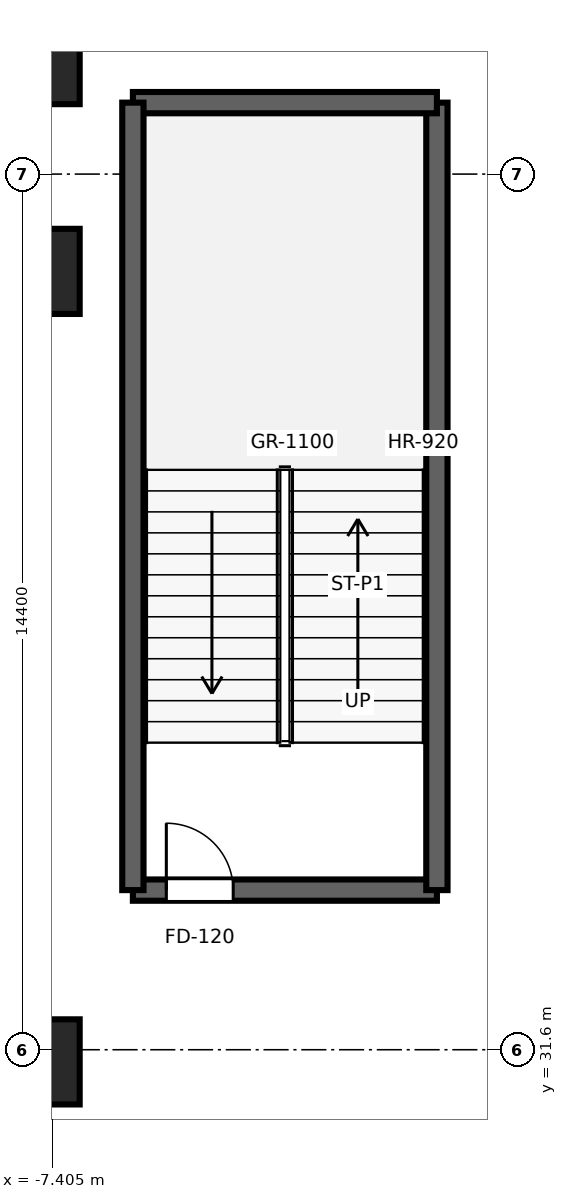
"""IFC4 building model, lengths in metres.
Left out: names, types, materials, properties, quantities, classifications, styles, units other than length and angle.
Written with IfcOpenShell. Run it as: python <this file> out.ifc"""

import sys

from ifc_helpers import new_model, si_unit, direction, frame, frame_2d, origin, origin_2d, place, context, subcontext, project, spatial, rectangle, extrude, source, transform, mapped, element, fill, save


model = new_model("IFC4")
c1 = context("Model", 3, precision=1e-05, world=origin(), true_north=direction((0.0, 1.0)))
c2 = subcontext(c1, "Body", "Model", "MODEL_VIEW")
j1 = project(units=[si_unit("LENGTHUNIT", "METRE"), si_unit("PLANEANGLEUNIT", "RADIAN")], contexts=[c1])
p1 = place(None, origin())
s1 = spatial("IfcSite", under=j1, at=p1, CompositionType="ELEMENT")
p2 = place(p1, origin())
s2 = spatial("IfcBuilding", under=s1, at=p2, CompositionType="ELEMENT")
p3 = place(p2, frame((0.0, 0.0, 6.0)))
s3 = spatial("IfcBuildingStorey", under=s2, at=p3, CompositionType="ELEMENT", Elevation=6.0)
p4 = place(p3, frame((-6.075, 34.225, 0.0), z_axis=(0.0, 0.0, 1.0), x_axis=(1.0, 0.0, 0.0)))
e1 = element("IfcWall", 1, at=p4, inside=s3, PredefinedType="SHEAR", context=c2, shape_type="SweptSolid", body=[
    extrude(rectangle(XDim=5.0, YDim=0.35, at=frame_2d((2.5, 0.0))), origin(), (0.0, 0.0, 1.0), 5.0),
])
p5 = place(p4, frame((0.55, 0.0, 0.0)))
e2 = element("IfcOpeningElement", 2, at=p5, cuts=e1, PredefinedType="OPENING", context=c2, shape_type="SweptSolid", body=[
    extrude(rectangle(XDim=1.1, YDim=2.12, at=frame_2d((0.55, 1.06))), frame((0.0, 0.185, 0.0), z_axis=(0.0, -1.0, 0.0), x_axis=(1.0, 0.0, 0.0)), (0.0, 0.0, 1.0), 0.37),
])
p6 = place(p3, frame((-1.075, 34.225, 0.0), z_axis=(0.0, 0.0, 1.0), x_axis=(0.0, 1.0, 0.0)))
e3 = element("IfcWall", 3, at=p6, inside=s3, PredefinedType="SHEAR", context=c2, shape_type="SweptSolid", body=[
    extrude(rectangle(XDim=12.95, YDim=0.35, at=frame_2d((6.475, 0.0))), origin(), (0.0, 0.0, 1.0), 5.0),
])
p7 = place(p3, frame((-1.075, 47.175, 0.0), z_axis=(0.0, 0.0, 1.0), x_axis=(-1.0, 0.0, 0.0)))
e4 = element("IfcWall", 4, at=p7, inside=s3, PredefinedType="SHEAR", context=c2, shape_type="SweptSolid", body=[
    extrude(rectangle(XDim=5.0, YDim=0.35, at=frame_2d((2.5, 0.0))), origin(), (0.0, 0.0, 1.0), 5.0),
])
p8 = place(p3, frame((-6.075, 47.175, 0.0), z_axis=(0.0, 0.0, 1.0), x_axis=(0.0, -1.0, 0.0)))
e5 = element("IfcWall", 5, at=p8, inside=s3, PredefinedType="SHEAR", context=c2, shape_type="SweptSolid", body=[
    extrude(rectangle(XDim=12.95, YDim=0.35, at=frame_2d((6.475, 0.0))), origin(), (0.0, 0.0, 1.0), 5.0),
])
m1 = source(origin(), c2, "Body", "SweptSolid", [
    extrude(rectangle(XDim=1.4, YDim=1.4, at=origin_2d()), origin(), (0.0, 0.0, 1.0), 5.0),
])
for number, where, z_axis, x_axis in (
    (6, (-7.65, 31.4, 0.0), (0.0, 0.0, 1.0), (1.0, 0.0, 0.0)),
    (7, (-7.65, 44.4, 0.0), (0.0, 0.0, 1.0), (1.0, 0.0, 0.0)),
    (8, (-7.65, 47.85, 0.0), (0.0, 0.0, 1.0), (1.0, 0.0, 0.0)),
):
    element("IfcColumn", number, at=place(p3, frame(where, z_axis=z_axis, x_axis=x_axis)), inside=s3, PredefinedType="COLUMN", context=c2, shape_type="MappedRepresentation", body=[
        mapped(m1, transform((0.0, 0.0, 0.0), x_axis=(1.0, 0.0, 0.0), y_axis=(0.0, 1.0, 0.0), z_axis=(0.0, 0.0, 1.0), scale=1.0)),
    ])
m2 = source(origin(), c2, "Body", "SweptSolid", [
    extrude(rectangle(XDim=1.1, YDim=2.12, at=frame_2d((0.55, 1.06))), frame((0.0, 0.025, 0.0), z_axis=(0.0, -1.0, 0.0), x_axis=(1.0, 0.0, 0.0)), (0.0, 0.0, 1.0), 0.05),
])
p9 = place(p5, origin())
e9 = element("IfcDoor", 9, at=p9, inside=s3, OperationType="SINGLE_SWING_LEFT", PredefinedType="DOOR", context=c2, shape_type="MappedRepresentation", body=[
    mapped(m2, transform((0.0, 0.0, 0.0), x_axis=(1.0, 0.0, 0.0), y_axis=(0.0, 1.0, 0.0), z_axis=(0.0, 0.0, 1.0), scale=1.0)),
])
fill(e2, e9)
save(model, sys.argv[1])
